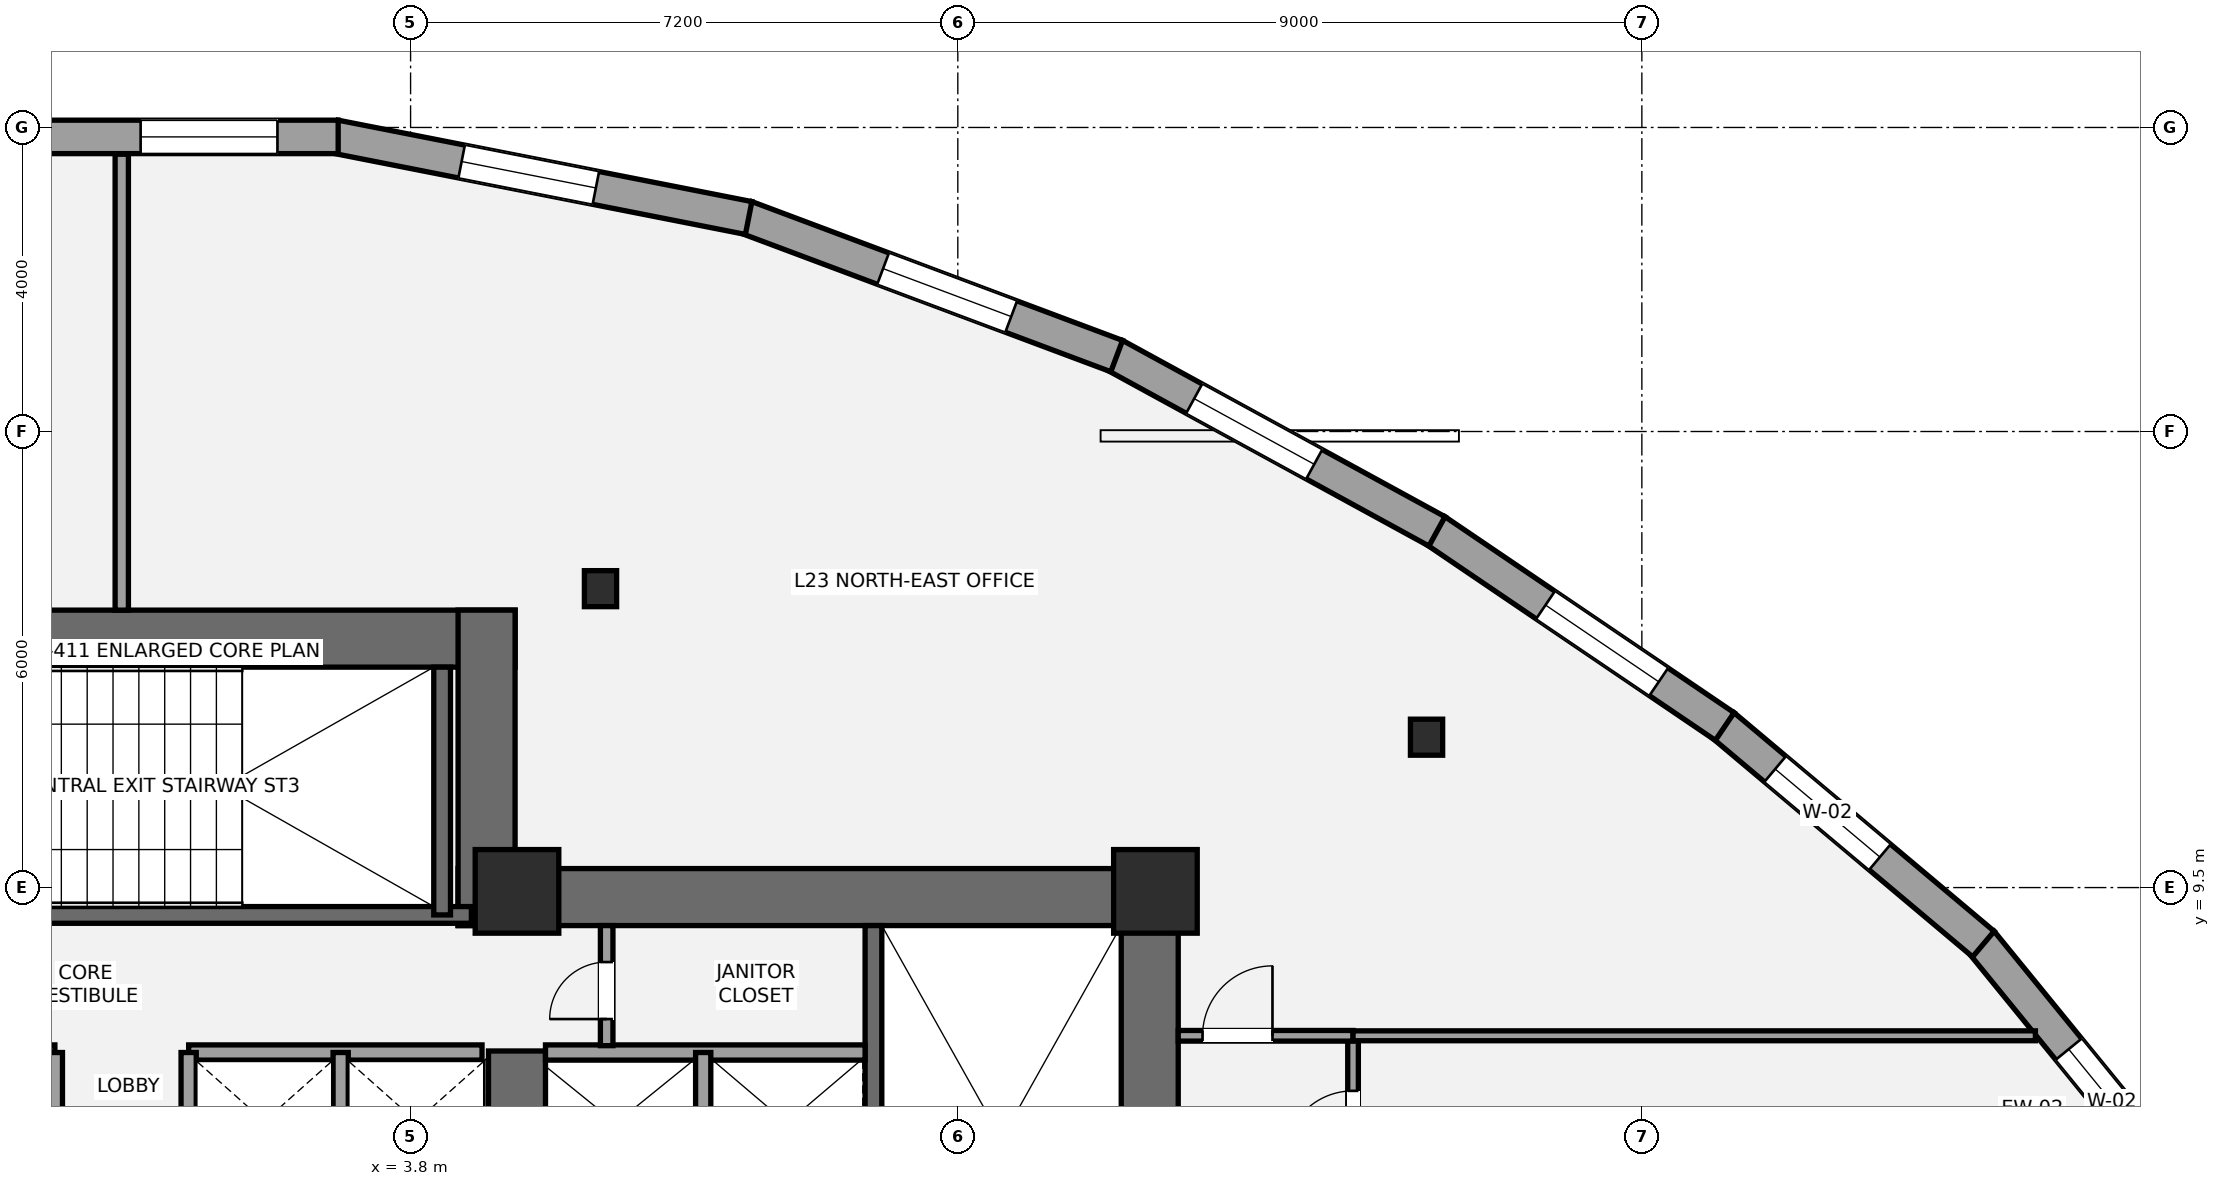
"""IFC4 building model, lengths in metres.
Left out: names, types, materials, properties, quantities, classifications, styles, units other than length and angle.
Written with IfcOpenShell. Run it as: python <this file> out.ifc"""

import sys

from ifc_helpers import new_model, si_unit, direction, frame, frame_2d, origin, origin_2d, place, context, subcontext, project, spatial, rectangle, i_section, extrude, element, fill, save


model = new_model("IFC4")
c1 = context("Model", 3, precision=1e-05, world=origin(), true_north=direction((0.0, 1.0)))
c2 = subcontext(c1, "Body", "Model", "MODEL_VIEW")
j1 = project(units=[si_unit("LENGTHUNIT", "METRE"), si_unit("PLANEANGLEUNIT", "RADIAN")], contexts=[c1])
p1 = place(None, origin())
s1 = spatial("IfcSite", under=j1, at=p1, CompositionType="ELEMENT")
p2 = place(p1, origin())
s2 = spatial("IfcBuilding", under=s1, at=p2, CompositionType="ELEMENT")
p3 = place(p2, frame((0.0, 0.0, 89.6)))
s3 = spatial("IfcBuildingStorey", under=s2, at=p3, CompositionType="ELEMENT", Elevation=89.6)
p4 = place(p3, frame((13.525, 1.1, 0.0), z_axis=(0.0, 0.0, 1.0), x_axis=(0.0, 1.0, 0.0)))
e1 = element("IfcWall", 1, at=p4, inside=s3, PredefinedType="SHEAR", context=c2, shape_type="SweptSolid", body=[
    extrude(rectangle(XDim=8.65, YDim=0.75, at=frame_2d((4.325, 0.0))), origin(), (0.0, 0.0, 1.0), 3.5),
])
p5 = place(p3, frame((4.425, 9.375, 0.0), z_axis=(0.0, 0.0, 1.0), x_axis=(1.0, 0.0, 0.0)))
e2 = element("IfcWall", 2, at=p5, inside=s3, PredefinedType="SHEAR", context=c2, shape_type="SweptSolid", body=[
    extrude(rectangle(XDim=9.475, YDim=0.75, at=frame_2d((4.737, 0.0))), origin(), (0.0, 0.0, 1.0), 3.5),
])
p6 = place(p3, frame((5.2, 5.35, 0.0), z_axis=(0.0, 0.0, 1.0), x_axis=(0.0, 1.0, 0.0)))
e3 = element("IfcWall", 3, at=p6, inside=s3, PredefinedType="SHEAR", context=c2, shape_type="SweptSolid", body=[
    extrude(rectangle(XDim=2.0, YDim=0.75, at=frame_2d((1.0, 0.0))), origin(), (0.0, 0.0, 1.0), 3.5),
])
p7 = place(p3, frame((9.89, 1.85, 0.0), z_axis=(0.0, 0.0, 1.0), x_axis=(0.0, 1.0, 0.0)))
e4 = element("IfcWall", 4, at=p7, inside=s3, PredefinedType="SHEAR", context=c2, shape_type="SweptSolid", body=[
    extrude(rectangle(XDim=7.15, YDim=0.22, at=frame_2d((3.575, 0.0))), origin(), (0.0, 0.0, 1.0), 3.5),
])
p8 = place(p3, frame((-5.175, 12.775, 0.0), z_axis=(0.0, 0.0, 1.0), x_axis=(1.0, 0.0, 0.0)))
e5 = element("IfcWall", 5, at=p8, inside=s3, PredefinedType="SHEAR", context=c2, shape_type="SweptSolid", body=[
    extrude(rectangle(XDim=10.35, YDim=0.75, at=frame_2d((5.175, 0.0))), origin(), (0.0, 0.0, 1.0), 3.5),
])
p9 = place(p3, frame((4.8, 9.0, 0.0), z_axis=(0.0, 0.0, 1.0), x_axis=(0.0, 1.0, 0.0)))
e6 = element("IfcWall", 6, at=p9, inside=s3, PredefinedType="SHEAR", context=c2, shape_type="SweptSolid", body=[
    extrude(rectangle(XDim=4.15, YDim=0.75, at=frame_2d((2.075, 0.0))), origin(), (0.0, 0.0, 1.0), 3.5),
])
p10 = place(p3, frame((-4.7, 9.14, 0.0), z_axis=(0.0, 0.0, 1.0), x_axis=(1.0, 0.0, 0.0)))
e7 = element("IfcWall", 7, at=p10, inside=s3, PredefinedType="SHEAR", context=c2, shape_type="SweptSolid", body=[
    extrude(rectangle(XDim=9.3, YDim=0.22, at=frame_2d((4.65, 0.0))), origin(), (0.0, 0.0, 1.0), 3.5),
])
p11 = place(p10, frame((1.15, 0.0, 0.0)))
e8 = element("IfcOpeningElement", 8, at=p11, cuts=e7, PredefinedType="OPENING", context=c2, shape_type="SweptSolid", body=[
    extrude(rectangle(XDim=1.05, YDim=2.15, at=frame_2d((0.525, 1.075))), frame((0.0, 0.12, 0.0), z_axis=(0.0, -1.0, 0.0), x_axis=(1.0, 0.0, 0.0)), (0.0, 0.0, 1.0), 0.24),
])
p12 = place(p3, frame((4.215, 9.14, 0.0), z_axis=(0.0, 0.0, 1.0), x_axis=(0.0, 1.0, 0.0)))
e9 = element("IfcWall", 9, at=p12, inside=s3, PredefinedType="SHEAR", context=c2, shape_type="SweptSolid", body=[
    extrude(rectangle(XDim=3.26, YDim=0.22, at=frame_2d((1.63, 0.0))), origin(), (0.0, 0.0, 1.0), 3.5),
])
for number, where, z_axis, x_axis in (
    (10, (5.2, 9.45, 0.0), (0.0, 0.0, 1.0), (1.0, 0.0, 0.0)),
    (11, (13.6, 9.45, 0.0), (0.0, 0.0, 1.0), (1.0, 0.0, 0.0)),
):
    element("IfcColumn", number, at=place(p3, frame(where, z_axis=z_axis, x_axis=x_axis)), inside=s3, PredefinedType="COLUMN", context=c2, shape_type="SweptSolid", body=[
        extrude(rectangle(XDim=1.1, YDim=1.1, at=origin_2d()), origin(), (0.0, 0.0, 1.0), 3.5),
    ])
for number, where, z_axis, x_axis in (
    (12, (17.167, 11.478, 0.0), (0.0, 0.0, 1.0), (1.0, 0.0, 0.0)),
    (13, (6.299, 13.433, 0.0), (0.0, 0.0, 1.0), (1.0, 0.0, 0.0)),
):
    element("IfcColumn", number, at=place(p3, frame(where, z_axis=z_axis, x_axis=x_axis)), inside=s3, PredefinedType="COLUMN", context=c2, shape_type="SweptSolid", body=[
        extrude(i_section(OverallWidth=0.424, OverallDepth=0.474, WebThickness=0.048, FlangeThickness=0.077, at=origin_2d()), origin(), (0.0, 0.0, 1.0), 3.5),
    ])
p13 = place(p3, frame((24.464, 8.787, 0.0), z_axis=(0.0, 0.0, 1.0), x_axis=(0.631768505266, -0.775157116818, 0.0)))
e14 = element("IfcWall", 14, at=p13, inside=s3, PredefinedType="STANDARD", context=c2, shape_type="SweptSolid", body=[
    extrude(rectangle(XDim=4.265, YDim=0.44, at=frame_2d((2.133, 0.0))), origin(), (0.0, 0.0, 1.0), 2.528),
])
p14 = place(p13, frame((1.823, 0.0, 0.65)))
e15 = element("IfcOpeningElement", 15, at=p14, cuts=e14, PredefinedType="OPENING", context=c2, shape_type="SweptSolid", body=[
    extrude(rectangle(XDim=1.8, YDim=1.7, at=frame_2d((0.9, 0.85))), frame((0.0, 0.23, 0.0), z_axis=(0.0, -1.0, 0.0), x_axis=(1.0, 0.0, 0.0)), (0.0, 0.0, 1.0), 0.46),
])
p15 = place(p3, frame((21.072, 11.632, 0.0), z_axis=(0.0, 0.0, 1.0), x_axis=(0.765563867956, -0.643359902449, 0.0)))
e16 = element("IfcWall", 16, at=p15, inside=s3, PredefinedType="STANDARD", context=c2, shape_type="SweptSolid", body=[
    extrude(rectangle(XDim=4.469, YDim=0.44, at=frame_2d((2.234, 0.0))), origin(), (0.0, 0.0, 1.0), 2.528),
])
p16 = place(p15, frame((0.891, 0.0, 0.65)))
e17 = element("IfcOpeningElement", 17, at=p16, cuts=e16, PredefinedType="OPENING", context=c2, shape_type="SweptSolid", body=[
    extrude(rectangle(XDim=1.8, YDim=1.7, at=frame_2d((0.9, 0.85))), frame((0.0, 0.23, 0.0), z_axis=(0.0, -1.0, 0.0), x_axis=(1.0, 0.0, 0.0)), (0.0, 0.0, 1.0), 0.46),
])
p17 = place(p3, frame((17.286, 14.197, 0.0), z_axis=(0.0, 0.0, 1.0), x_axis=(0.827742791179, -0.561107718403, 0.0)))
e18 = element("IfcWall", 18, at=p17, inside=s3, PredefinedType="STANDARD", context=c2, shape_type="SweptSolid", body=[
    extrude(rectangle(XDim=4.595, YDim=0.44, at=frame_2d((2.298, 0.0))), origin(), (0.0, 0.0, 1.0), 2.528),
])
p18 = place(p17, frame((1.747, 0.0, 0.65)))
e19 = element("IfcOpeningElement", 19, at=p18, cuts=e18, PredefinedType="OPENING", context=c2, shape_type="SweptSolid", body=[
    extrude(rectangle(XDim=1.8, YDim=1.7, at=frame_2d((0.9, 0.85))), frame((0.0, 0.23, 0.0), z_axis=(0.0, -1.0, 0.0), x_axis=(1.0, 0.0, 0.0)), (0.0, 0.0, 1.0), 0.46),
])
p19 = place(p3, frame((13.062, 16.505, 0.0), z_axis=(0.0, 0.0, 1.0), x_axis=(0.877445532469, -0.479676284123, 0.0)))
e20 = element("IfcWall", 20, at=p19, inside=s3, PredefinedType="STANDARD", context=c2, shape_type="SweptSolid", body=[
    extrude(rectangle(XDim=4.835, YDim=0.44, at=frame_2d((2.417, 0.0))), origin(), (0.0, 0.0, 1.0), 2.528),
])
p20 = place(p19, frame((1.194, 0.0, 0.65)))
e21 = element("IfcOpeningElement", 21, at=p20, cuts=e20, PredefinedType="OPENING", context=c2, shape_type="SweptSolid", body=[
    extrude(rectangle(XDim=1.8, YDim=1.7, at=frame_2d((0.9, 0.85))), frame((0.0, 0.23, 0.0), z_axis=(0.0, -1.0, 0.0), x_axis=(1.0, 0.0, 0.0)), (0.0, 0.0, 1.0), 0.46),
])
p21 = place(p3, frame((8.213, 18.319, 0.0), z_axis=(0.0, 0.0, 1.0), x_axis=(0.936473584013, -0.350738116613, 0.0)))
e22 = element("IfcWall", 22, at=p21, inside=s3, PredefinedType="STANDARD", context=c2, shape_type="SweptSolid", body=[
    extrude(rectangle(XDim=5.208, YDim=0.44, at=frame_2d((2.604, 0.0))), origin(), (0.0, 0.0, 1.0), 2.528),
])
p22 = place(p21, frame((1.926, 0.0, 0.65)))
e23 = element("IfcOpeningElement", 23, at=p22, cuts=e22, PredefinedType="OPENING", context=c2, shape_type="SweptSolid", body=[
    extrude(rectangle(XDim=1.8, YDim=1.7, at=frame_2d((0.9, 0.85))), frame((0.0, 0.23, 0.0), z_axis=(0.0, -1.0, 0.0), x_axis=(1.0, 0.0, 0.0)), (0.0, 0.0, 1.0), 0.46),
])
p23 = place(p3, frame((2.805, 19.38, 0.0), z_axis=(0.0, 0.0, 1.0), x_axis=(0.981185300561, -0.19306839711, 0.0)))
e24 = element("IfcWall", 24, at=p23, inside=s3, PredefinedType="STANDARD", context=c2, shape_type="SweptSolid", body=[
    extrude(rectangle(XDim=5.548, YDim=0.44, at=frame_2d((2.774, 0.0))), origin(), (0.0, 0.0, 1.0), 2.528),
])
p24 = place(p23, frame((1.699, 0.0, 0.65)))
e25 = element("IfcOpeningElement", 25, at=p24, cuts=e24, PredefinedType="OPENING", context=c2, shape_type="SweptSolid", body=[
    extrude(rectangle(XDim=1.8, YDim=1.7, at=frame_2d((0.9, 0.85))), frame((0.0, 0.23, 0.0), z_axis=(0.0, -1.0, 0.0), x_axis=(1.0, 0.0, 0.0)), (0.0, 0.0, 1.0), 0.46),
])
p25 = place(p3, frame((-2.847, 19.376, 0.0), z_axis=(0.0, 0.0, 1.0), x_axis=(1.0, 0.0, 0.0)))
e26 = element("IfcWall", 26, at=p25, inside=s3, PredefinedType="STANDARD", context=c2, shape_type="SweptSolid", body=[
    extrude(rectangle(XDim=5.695, YDim=0.44, at=frame_2d((2.847, 0.0))), origin(), (0.0, 0.0, 1.0), 2.528),
])
p26 = place(p25, frame((3.095, 0.0, 0.65)))
e27 = element("IfcOpeningElement", 27, at=p26, cuts=e26, PredefinedType="OPENING", context=c2, shape_type="SweptSolid", body=[
    extrude(rectangle(XDim=1.8, YDim=1.7, at=frame_2d((0.9, 0.85))), frame((0.0, 0.23, 0.0), z_axis=(0.0, -1.0, 0.0), x_axis=(1.0, 0.0, 0.0)), (0.0, 0.0, 1.0), 0.46),
])
p27 = place(p3, frame((5.575, 7.33, 0.0), z_axis=(0.0, 0.0, 1.0), x_axis=(1.0, 0.0, 0.0)))
e28 = element("IfcWall", 28, at=p27, inside=s3, PredefinedType="SOLIDWALL", context=c2, shape_type="SweptSolid", body=[
    extrude(rectangle(XDim=4.205, YDim=0.2, at=frame_2d((2.103, 0.0))), origin(), (0.0, 0.0, 1.0), 3.31),
])
p28 = place(p3, frame((7.65, 5.47, 0.0), z_axis=(0.0, 0.0, 1.0), x_axis=(0.0, 1.0, 0.0)))
e29 = element("IfcWall", 29, at=p28, inside=s3, PredefinedType="SOLIDWALL", context=c2, shape_type="SweptSolid", body=[
    extrude(rectangle(XDim=1.86, YDim=0.2, at=frame_2d((0.93, 0.0))), origin(), (0.0, 0.0, 1.0), 3.31),
])
for number, where, z_axis, x_axis in (
    (30, (-4.74, 7.33, 0.0), (0.0, 0.0, 1.0), (1.0, 0.0, 0.0)),
    (31, (0.88, 7.33, 0.0), (0.0, 0.0, 1.0), (1.0, 0.0, 0.0)),
):
    element("IfcWall", number, at=place(p3, frame(where, z_axis=z_axis, x_axis=x_axis)), inside=s3, PredefinedType="SOLIDWALL", context=c2, shape_type="SweptSolid", body=[
        extrude(rectangle(XDim=3.86, YDim=0.2, at=frame_2d((1.93, 0.0))), origin(), (0.0, 0.0, 1.0), 3.31),
    ])
for number, where, z_axis, x_axis in (
    (32, (2.88, 5.52, 0.0), (0.0, 0.0, 1.0), (0.0, 1.0, 0.0)),
    (33, (-0.88, 5.52, 0.0), (0.0, 0.0, 1.0), (0.0, 1.0, 0.0)),
    (34, (0.88, 5.52, 0.0), (0.0, 0.0, 1.0), (0.0, 1.0, 0.0)),
):
    element("IfcWall", number, at=place(p3, frame(where, z_axis=z_axis, x_axis=x_axis)), inside=s3, PredefinedType="SOLIDWALL", context=c2, shape_type="SweptSolid", body=[
        extrude(rectangle(XDim=1.81, YDim=0.2, at=frame_2d((0.905, 0.0))), origin(), (0.0, 0.0, 1.0), 3.31),
    ])
p29 = place(p3, frame((6.38, 7.42, 0.0), z_axis=(0.0, 0.0, 1.0), x_axis=(0.0, 1.0, 0.0)))
e35 = element("IfcWall", 35, at=p29, inside=s3, PredefinedType="PARTITIONING", context=c2, shape_type="SweptSolid", body=[
    extrude(rectangle(XDim=1.58, YDim=0.165, at=frame_2d((0.79, 0.0))), origin(), (0.0, 0.0, 1.0), 3.31),
])
p30 = place(p29, frame((0.35, 0.0, 0.0)))
e36 = element("IfcOpeningElement", 36, at=p30, cuts=e35, PredefinedType="OPENING", context=c2, shape_type="SweptSolid", body=[
    extrude(rectangle(XDim=0.75, YDim=2.1, at=frame_2d((0.375, 1.05))), frame((0.0, 0.093, 0.0), z_axis=(0.0, -1.0, 0.0), x_axis=(1.0, 0.0, 0.0)), (0.0, 0.0, 1.0), 0.185),
])
p31 = place(p3, frame((16.2, -14.53, 0.0), z_axis=(0.0, 0.0, 1.0), x_axis=(0.0, 1.0, 0.0)))
e37 = element("IfcWall", 37, at=p31, inside=s3, PredefinedType="PARTITIONING", context=c2, shape_type="SweptSolid", body=[
    extrude(rectangle(XDim=22.08, YDim=0.14, at=frame_2d((11.04, 0.0))), origin(), (0.0, 0.0, 1.0), 2.751),
])
p32 = place(p31, frame((10.281, 0.0, 0.0)))
e38 = element("IfcOpeningElement", 38, at=p32, cuts=e37, PredefinedType="OPENING", context=c2, shape_type="SweptSolid", body=[
    extrude(rectangle(XDim=0.9, YDim=2.1, at=frame_2d((0.45, 1.05))), frame((0.0, 0.08, 0.0), z_axis=(0.0, -1.0, 0.0), x_axis=(1.0, 0.0, 0.0)), (0.0, 0.0, 1.0), 0.16),
])
p33 = place(p31, frame((14.18, 0.0, 0.0)))
e39 = element("IfcOpeningElement", 39, at=p33, cuts=e37, PredefinedType="OPENING", context=c2, shape_type="SweptSolid", body=[
    extrude(rectangle(XDim=0.9, YDim=2.1, at=frame_2d((0.45, 1.05))), frame((0.0, 0.08, 0.0), z_axis=(0.0, -1.0, 0.0), x_axis=(1.0, 0.0, 0.0)), (0.0, 0.0, 1.0), 0.16),
])
p34 = place(p31, frame((17.68, 0.0, 0.0)))
e40 = element("IfcOpeningElement", 40, at=p34, cuts=e37, PredefinedType="OPENING", context=c2, shape_type="SweptSolid", body=[
    extrude(rectangle(XDim=0.9, YDim=2.1, at=frame_2d((0.45, 1.05))), frame((0.0, 0.08, 0.0), z_axis=(0.0, -1.0, 0.0), x_axis=(1.0, 0.0, 0.0)), (0.0, 0.0, 1.0), 0.16),
])
p35 = place(p31, frame((20.455, 0.0, 0.0)))
e41 = element("IfcOpeningElement", 41, at=p35, cuts=e37, PredefinedType="OPENING", context=c2, shape_type="SweptSolid", body=[
    extrude(rectangle(XDim=0.9, YDim=2.1, at=frame_2d((0.45, 1.05))), frame((0.0, 0.08, 0.0), z_axis=(0.0, -1.0, 0.0), x_axis=(1.0, 0.0, 0.0)), (0.0, 0.0, 1.0), 0.16),
])
p36 = place(p3, frame((13.9, 7.55, 0.0), z_axis=(0.0, 0.0, 1.0), x_axis=(1.0, 0.0, 0.0)))
e42 = element("IfcWall", 42, at=p36, inside=s3, PredefinedType="PARTITIONING", context=c2, shape_type="SweptSolid", body=[
    extrude(rectangle(XDim=2.3, YDim=0.14, at=frame_2d((1.15, 0.0))), origin(), (0.0, 0.0, 1.0), 2.763),
])
p37 = place(p36, frame((0.32, 0.0, 0.0)))
e43 = element("IfcOpeningElement", 43, at=p37, cuts=e42, PredefinedType="OPENING", context=c2, shape_type="SweptSolid", body=[
    extrude(rectangle(XDim=0.92, YDim=2.15, at=frame_2d((0.46, 1.075))), frame((0.0, 0.08, 0.0), z_axis=(0.0, -1.0, 0.0), x_axis=(1.0, 0.0, 0.0)), (0.0, 0.0, 1.0), 0.16),
])
p38 = place(p3, frame((0.0, 13.15, 0.0), z_axis=(0.0, 0.0, 1.0), x_axis=(0.0, 1.0, 0.0)))
e44 = element("IfcWall", 44, at=p38, inside=s3, PredefinedType="PARTITIONING", context=c2, shape_type="SweptSolid", body=[
    extrude(rectangle(XDim=5.998, YDim=0.175, at=frame_2d((2.999, 0.0))), origin(), (0.0, 0.0, 1.0), 2.763),
])
p39 = place(p3, frame((16.2, 7.55, 0.0), z_axis=(0.0, 0.0, 1.0), x_axis=(1.0, 0.0, 0.0)))
e45 = element("IfcWall", 45, at=p39, inside=s3, PredefinedType="PARTITIONING", context=c2, shape_type="SweptSolid", body=[
    extrude(rectangle(XDim=8.978, YDim=0.13, at=frame_2d((4.489, 0.0))), origin(), (0.0, 0.0, 1.0), 2.763),
])
p40 = place(p14, origin())
e46 = element("IfcWindow", 46, at=p40, inside=s3, PartitioningType="SINGLE_PANEL", PredefinedType="WINDOW", context=c2, shape_type="SweptSolid", body=[
    extrude(rectangle(XDim=1.8, YDim=1.7, at=frame_2d((0.9, 0.85))), frame((0.0, -0.01, 0.0), z_axis=(0.0, -1.0, 0.0), x_axis=(1.0, 0.0, 0.0)), (0.0, 0.0, 1.0), 0.06),
])
fill(e15, e46)
p41 = place(p16, origin())
e47 = element("IfcWindow", 47, at=p41, inside=s3, PartitioningType="SINGLE_PANEL", PredefinedType="WINDOW", context=c2, shape_type="SweptSolid", body=[
    extrude(rectangle(XDim=1.8, YDim=1.7, at=frame_2d((0.9, 0.85))), frame((0.0, -0.01, 0.0), z_axis=(0.0, -1.0, 0.0), x_axis=(1.0, 0.0, 0.0)), (0.0, 0.0, 1.0), 0.06),
])
fill(e17, e47)
p42 = place(p18, origin())
e48 = element("IfcWindow", 48, at=p42, inside=s3, PartitioningType="SINGLE_PANEL", PredefinedType="WINDOW", context=c2, shape_type="SweptSolid", body=[
    extrude(rectangle(XDim=1.8, YDim=1.7, at=frame_2d((0.9, 0.85))), frame((0.0, -0.01, 0.0), z_axis=(0.0, -1.0, 0.0), x_axis=(1.0, 0.0, 0.0)), (0.0, 0.0, 1.0), 0.06),
])
fill(e19, e48)
p43 = place(p20, origin())
e49 = element("IfcWindow", 49, at=p43, inside=s3, PartitioningType="SINGLE_PANEL", PredefinedType="WINDOW", context=c2, shape_type="SweptSolid", body=[
    extrude(rectangle(XDim=1.8, YDim=1.7, at=frame_2d((0.9, 0.85))), frame((0.0, -0.01, 0.0), z_axis=(0.0, -1.0, 0.0), x_axis=(1.0, 0.0, 0.0)), (0.0, 0.0, 1.0), 0.06),
])
fill(e21, e49)
p44 = place(p22, origin())
e50 = element("IfcWindow", 50, at=p44, inside=s3, PartitioningType="SINGLE_PANEL", PredefinedType="WINDOW", context=c2, shape_type="SweptSolid", body=[
    extrude(rectangle(XDim=1.8, YDim=1.7, at=frame_2d((0.9, 0.85))), frame((0.0, -0.01, 0.0), z_axis=(0.0, -1.0, 0.0), x_axis=(1.0, 0.0, 0.0)), (0.0, 0.0, 1.0), 0.06),
])
fill(e23, e50)
p45 = place(p24, origin())
e51 = element("IfcWindow", 51, at=p45, inside=s3, PartitioningType="SINGLE_PANEL", PredefinedType="WINDOW", context=c2, shape_type="SweptSolid", body=[
    extrude(rectangle(XDim=1.8, YDim=1.7, at=frame_2d((0.9, 0.85))), frame((0.0, -0.01, 0.0), z_axis=(0.0, -1.0, 0.0), x_axis=(1.0, 0.0, 0.0)), (0.0, 0.0, 1.0), 0.06),
])
fill(e25, e51)
p46 = place(p26, origin())
e52 = element("IfcWindow", 52, at=p46, inside=s3, PartitioningType="SINGLE_PANEL", PredefinedType="WINDOW", context=c2, shape_type="SweptSolid", body=[
    extrude(rectangle(XDim=1.8, YDim=1.7, at=frame_2d((0.9, 0.85))), frame((0.0, -0.01, 0.0), z_axis=(0.0, -1.0, 0.0), x_axis=(1.0, 0.0, 0.0)), (0.0, 0.0, 1.0), 0.06),
])
fill(e27, e52)
p47 = place(p30, origin())
e53 = element("IfcDoor", 53, at=p47, inside=s3, OperationType="SINGLE_SWING_LEFT", PredefinedType="DOOR", context=c2, shape_type="SweptSolid", body=[
    extrude(rectangle(XDim=0.75, YDim=2.1, at=frame_2d((0.375, 1.05))), frame((0.0, 0.025, 0.0), z_axis=(0.0, -1.0, 0.0), x_axis=(1.0, 0.0, 0.0)), (0.0, 0.0, 1.0), 0.05),
])
fill(e36, e53)
p48 = place(p37, origin())
e54 = element("IfcDoor", 54, at=p48, inside=s3, OperationType="SINGLE_SWING_RIGHT", PredefinedType="DOOR", context=c2, shape_type="SweptSolid", body=[
    extrude(rectangle(XDim=0.92, YDim=2.15, at=frame_2d((0.46, 1.075))), frame((0.0, 0.025, 0.0), z_axis=(0.0, -1.0, 0.0), x_axis=(1.0, 0.0, 0.0)), (0.0, 0.0, 1.0), 0.05),
])
fill(e43, e54)
p49 = place(p35, origin())
e55 = element("IfcDoor", 55, at=p49, inside=s3, OperationType="SINGLE_SWING_LEFT", PredefinedType="DOOR", context=c2, shape_type="SweptSolid", body=[
    extrude(rectangle(XDim=0.9, YDim=2.1, at=frame_2d((0.45, 1.05))), frame((0.0, 0.025, 0.0), z_axis=(0.0, -1.0, 0.0), x_axis=(1.0, 0.0, 0.0)), (0.0, 0.0, 1.0), 0.05),
])
fill(e41, e55)
save(model, sys.argv[1])
